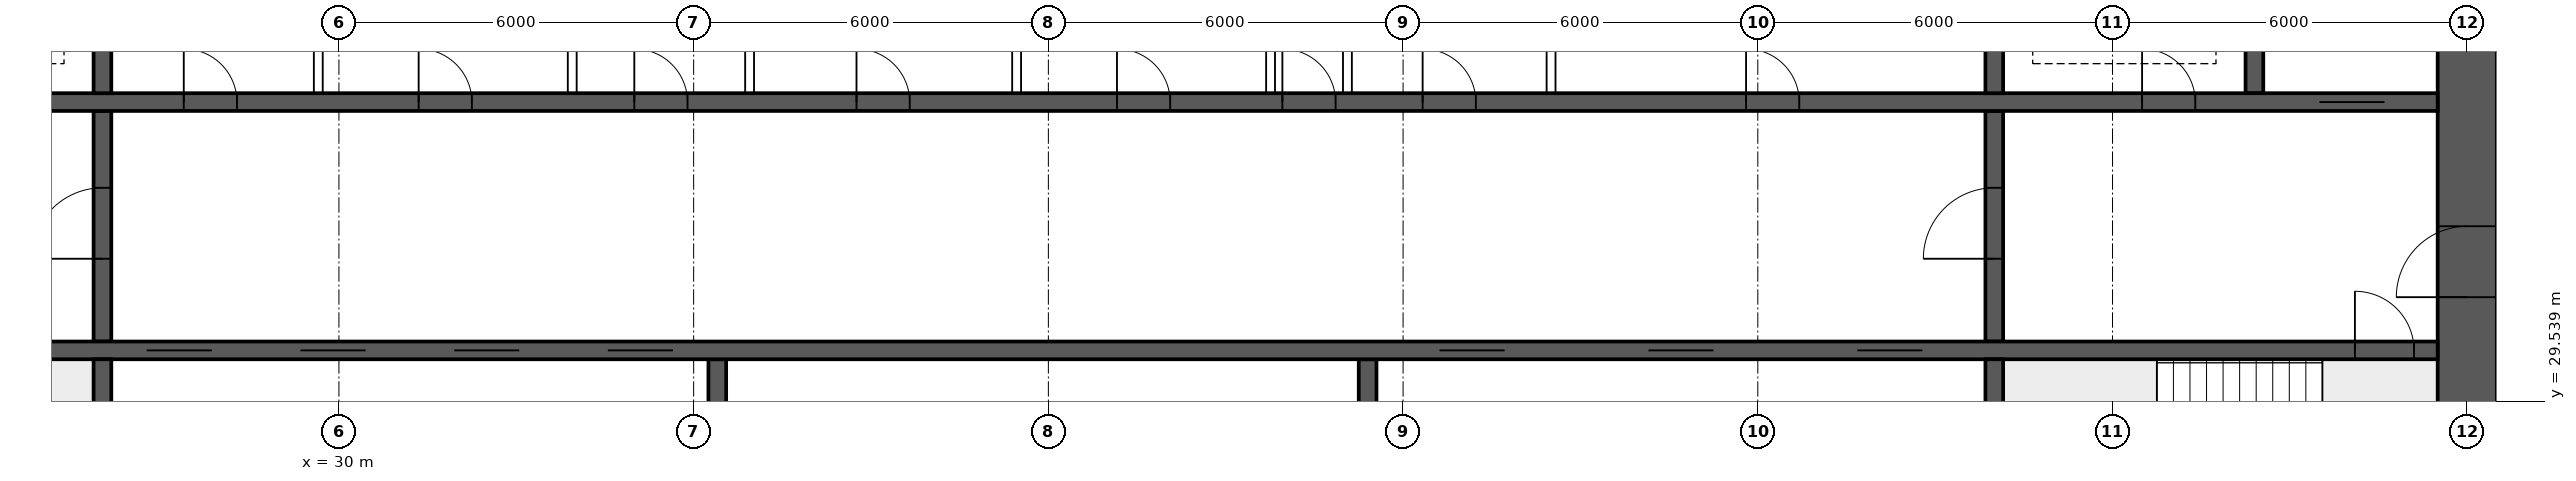
"""IFC4 building model, lengths in metres.
Left out: names, types, materials, properties, quantities, classifications, styles, units other than length and angle.
Written with IfcOpenShell. Run it as: python <this file> out.ifc"""

import sys

from ifc_helpers import new_model, si_unit, direction, frame, frame_2d, origin, place, context, subcontext, project, spatial, rectangle, extrude, element, fill, save


model = new_model("IFC4")
c1 = context("Model", 3, precision=1e-05, world=origin(), true_north=direction((0.0, 1.0)))
c2 = subcontext(c1, "Body", "Model", "MODEL_VIEW")
j1 = project(units=[si_unit("LENGTHUNIT", "METRE"), si_unit("PLANEANGLEUNIT", "RADIAN")], contexts=[c1])
p1 = place(None, origin())
s1 = spatial("IfcSite", under=j1, at=p1, CompositionType="ELEMENT")
p2 = place(p1, origin())
s2 = spatial("IfcBuilding", under=s1, at=p2, CompositionType="ELEMENT")
p3 = place(p2, frame((0.0, 0.0, 61.45)))
s3 = spatial("IfcBuildingStorey", under=s2, at=p3, CompositionType="ELEMENT", Elevation=61.45)
p4 = place(p3, frame((66.0, 26.3, 0.0), z_axis=(0.0, 0.0, 1.0), x_axis=(0.0, 1.0, 0.0)))
e1 = element("IfcWall", 1, at=p4, inside=s3, PredefinedType="SHEAR", context=c2, shape_type="SweptSolid", body=[
    extrude(rectangle(XDim=11.4, YDim=1.0, at=frame_2d((5.7, 0.0))), origin(), (0.0, 0.0, 1.0), 3.75),
])
p5 = place(p4, frame((5.0, 0.0, 0.0)))
e2 = element("IfcOpeningElement", 2, at=p5, cuts=e1, PredefinedType="OPENING", context=c2, shape_type="SweptSolid", body=[
    extrude(rectangle(XDim=1.2, YDim=2.1, at=frame_2d((0.6, 1.05))), frame((0.0, 0.51, 0.0), z_axis=(0.0, -1.0, 0.0), x_axis=(1.0, 0.0, 0.0)), (0.0, 0.0, 1.0), 1.02),
])
p6 = place(p3, frame((18.5, 30.4, 0.0), z_axis=(0.0, 0.0, 1.0), x_axis=(1.0, 0.0, 0.0)))
e3 = element("IfcWall", 3, at=p6, inside=s3, PredefinedType="SHEAR", context=c2, shape_type="SweptSolid", body=[
    extrude(rectangle(XDim=47.0, YDim=0.3, at=frame_2d((23.5, 0.0))), origin(), (0.0, 0.0, 1.0), 3.75),
])
p7 = place(p6, frame((0.4, 0.0, 0.0)))
e4 = element("IfcOpeningElement", 4, at=p7, cuts=e3, PredefinedType="OPENING", context=c2, shape_type="SweptSolid", body=[
    extrude(rectangle(XDim=1.0, YDim=2.1, at=frame_2d((0.5, 1.05))), frame((0.0, 0.16, 0.0), z_axis=(0.0, -1.0, 0.0), x_axis=(1.0, 0.0, 0.0)), (0.0, 0.0, 1.0), 0.32),
])
p8 = place(p6, frame((45.6, 0.0, 0.0)))
e5 = element("IfcOpeningElement", 5, at=p8, cuts=e3, PredefinedType="OPENING", context=c2, shape_type="SweptSolid", body=[
    extrude(rectangle(XDim=1.0, YDim=2.1, at=frame_2d((0.5, 1.05))), frame((0.0, 0.16, 0.0), z_axis=(0.0, -1.0, 0.0), x_axis=(1.0, 0.0, 0.0)), (0.0, 0.0, 1.0), 0.32),
])
p9 = place(p6, frame((8.25, 0.0, 0.0)))
e6 = element("IfcOpeningElement", 6, at=p9, cuts=e3, PredefinedType="OPENING", context=c2, shape_type="SweptSolid", body=[
    extrude(rectangle(XDim=1.1, YDim=2.1, at=frame_2d((0.55, 1.05))), frame((0.0, 0.16, 0.0), z_axis=(0.0, -1.0, 0.0), x_axis=(1.0, 0.0, 0.0)), (0.0, 0.0, 1.0), 0.32),
])
p10 = place(p6, frame((10.85, 0.0, 0.0)))
e7 = element("IfcOpeningElement", 7, at=p10, cuts=e3, PredefinedType="OPENING", context=c2, shape_type="SweptSolid", body=[
    extrude(rectangle(XDim=1.1, YDim=2.1, at=frame_2d((0.55, 1.05))), frame((0.0, 0.16, 0.0), z_axis=(0.0, -1.0, 0.0), x_axis=(1.0, 0.0, 0.0)), (0.0, 0.0, 1.0), 0.32),
])
p11 = place(p6, frame((13.45, 0.0, 0.0)))
e8 = element("IfcOpeningElement", 8, at=p11, cuts=e3, PredefinedType="OPENING", context=c2, shape_type="SweptSolid", body=[
    extrude(rectangle(XDim=1.1, YDim=2.1, at=frame_2d((0.55, 1.05))), frame((0.0, 0.16, 0.0), z_axis=(0.0, -1.0, 0.0), x_axis=(1.0, 0.0, 0.0)), (0.0, 0.0, 1.0), 0.32),
])
p12 = place(p6, frame((16.05, 0.0, 0.0)))
e9 = element("IfcOpeningElement", 9, at=p12, cuts=e3, PredefinedType="OPENING", context=c2, shape_type="SweptSolid", body=[
    extrude(rectangle(XDim=1.1, YDim=2.1, at=frame_2d((0.55, 1.05))), frame((0.0, 0.16, 0.0), z_axis=(0.0, -1.0, 0.0), x_axis=(1.0, 0.0, 0.0)), (0.0, 0.0, 1.0), 0.32),
])
p13 = place(p6, frame((30.117, 0.0, 0.0)))
e10 = element("IfcOpeningElement", 10, at=p13, cuts=e3, PredefinedType="OPENING", context=c2, shape_type="SweptSolid", body=[
    extrude(rectangle(XDim=1.1, YDim=2.1, at=frame_2d((0.55, 1.05))), frame((0.0, 0.16, 0.0), z_axis=(0.0, -1.0, 0.0), x_axis=(1.0, 0.0, 0.0)), (0.0, 0.0, 1.0), 0.32),
])
p14 = place(p6, frame((33.65, 0.0, 0.0)))
e11 = element("IfcOpeningElement", 11, at=p14, cuts=e3, PredefinedType="OPENING", context=c2, shape_type="SweptSolid", body=[
    extrude(rectangle(XDim=1.1, YDim=2.1, at=frame_2d((0.55, 1.05))), frame((0.0, 0.16, 0.0), z_axis=(0.0, -1.0, 0.0), x_axis=(1.0, 0.0, 0.0)), (0.0, 0.0, 1.0), 0.32),
])
p15 = place(p6, frame((37.183, 0.0, 0.0)))
e12 = element("IfcOpeningElement", 12, at=p15, cuts=e3, PredefinedType="OPENING", context=c2, shape_type="SweptSolid", body=[
    extrude(rectangle(XDim=1.1, YDim=2.1, at=frame_2d((0.55, 1.05))), frame((0.0, 0.16, 0.0), z_axis=(0.0, -1.0, 0.0), x_axis=(1.0, 0.0, 0.0)), (0.0, 0.0, 1.0), 0.32),
])
p16 = place(p3, frame((18.5, 34.6, 0.0), z_axis=(0.0, 0.0, 1.0), x_axis=(1.0, 0.0, 0.0)))
e13 = element("IfcWall", 13, at=p16, inside=s3, PredefinedType="SHEAR", context=c2, shape_type="SweptSolid", body=[
    extrude(rectangle(XDim=47.0, YDim=0.3, at=frame_2d((23.5, 0.0))), origin(), (0.0, 0.0, 1.0), 3.75),
])
p17 = place(p16, frame((0.9, 0.0, 0.0)))
e14 = element("IfcOpeningElement", 14, at=p17, cuts=e13, PredefinedType="OPENING", context=c2, shape_type="SweptSolid", body=[
    extrude(rectangle(XDim=1.1, YDim=2.1, at=frame_2d((0.55, 1.05))), frame((0.0, 0.16, 0.0), z_axis=(0.0, -1.0, 0.0), x_axis=(1.0, 0.0, 0.0)), (0.0, 0.0, 1.0), 0.32),
])
p18 = place(p16, frame((45.0, 0.0, 0.0)))
e15 = element("IfcOpeningElement", 15, at=p18, cuts=e13, PredefinedType="OPENING", context=c2, shape_type="SweptSolid", body=[
    extrude(rectangle(XDim=1.1, YDim=2.1, at=frame_2d((0.55, 1.05))), frame((0.0, 0.16, 0.0), z_axis=(0.0, -1.0, 0.0), x_axis=(1.0, 0.0, 0.0)), (0.0, 0.0, 1.0), 0.32),
])
p19 = place(p16, frame((4.1, 0.0, 0.0)))
e16 = element("IfcOpeningElement", 16, at=p19, cuts=e13, PredefinedType="OPENING", context=c2, shape_type="SweptSolid", body=[
    extrude(rectangle(XDim=0.9, YDim=2.1, at=frame_2d((0.45, 1.05))), frame((0.0, 0.16, 0.0), z_axis=(0.0, -1.0, 0.0), x_axis=(1.0, 0.0, 0.0)), (0.0, 0.0, 1.0), 0.32),
])
p20 = place(p16, frame((42.0, 0.0, 0.0)))
e17 = element("IfcOpeningElement", 17, at=p20, cuts=e13, PredefinedType="OPENING", context=c2, shape_type="SweptSolid", body=[
    extrude(rectangle(XDim=0.9, YDim=2.1, at=frame_2d((0.45, 1.05))), frame((0.0, 0.16, 0.0), z_axis=(0.0, -1.0, 0.0), x_axis=(1.0, 0.0, 0.0)), (0.0, 0.0, 1.0), 0.32),
])
p21 = place(p16, frame((8.875, 0.0, 0.0)))
e18 = element("IfcOpeningElement", 18, at=p21, cuts=e13, PredefinedType="OPENING", context=c2, shape_type="SweptSolid", body=[
    extrude(rectangle(XDim=0.9, YDim=2.1, at=frame_2d((0.45, 1.05))), frame((0.0, 0.16, 0.0), z_axis=(0.0, -1.0, 0.0), x_axis=(1.0, 0.0, 0.0)), (0.0, 0.0, 1.0), 0.32),
])
p22 = place(p16, frame((12.849, 0.0, 0.0)))
e19 = element("IfcOpeningElement", 19, at=p22, cuts=e13, PredefinedType="OPENING", context=c2, shape_type="SweptSolid", body=[
    extrude(rectangle(XDim=0.9, YDim=2.1, at=frame_2d((0.45, 1.05))), frame((0.0, 0.16, 0.0), z_axis=(0.0, -1.0, 0.0), x_axis=(1.0, 0.0, 0.0)), (0.0, 0.0, 1.0), 0.32),
])
p23 = place(p16, frame((16.496, 0.0, 0.0)))
e20 = element("IfcOpeningElement", 20, at=p23, cuts=e13, PredefinedType="OPENING", context=c2, shape_type="SweptSolid", body=[
    extrude(rectangle(XDim=0.9, YDim=2.1, at=frame_2d((0.45, 1.05))), frame((0.0, 0.16, 0.0), z_axis=(0.0, -1.0, 0.0), x_axis=(1.0, 0.0, 0.0)), (0.0, 0.0, 1.0), 0.32),
])
p24 = place(p16, frame((20.255, 0.0, 0.0)))
e21 = element("IfcOpeningElement", 21, at=p24, cuts=e13, PredefinedType="OPENING", context=c2, shape_type="SweptSolid", body=[
    extrude(rectangle(XDim=0.9, YDim=2.1, at=frame_2d((0.45, 1.05))), frame((0.0, 0.16, 0.0), z_axis=(0.0, -1.0, 0.0), x_axis=(1.0, 0.0, 0.0)), (0.0, 0.0, 1.0), 0.32),
])
p25 = place(p16, frame((24.661, 0.0, 0.0)))
e22 = element("IfcOpeningElement", 22, at=p25, cuts=e13, PredefinedType="OPENING", context=c2, shape_type="SweptSolid", body=[
    extrude(rectangle(XDim=0.9, YDim=2.1, at=frame_2d((0.45, 1.05))), frame((0.0, 0.16, 0.0), z_axis=(0.0, -1.0, 0.0), x_axis=(1.0, 0.0, 0.0)), (0.0, 0.0, 1.0), 0.32),
])
p26 = place(p16, frame((27.458, 0.0, 0.0)))
e23 = element("IfcOpeningElement", 23, at=p26, cuts=e13, PredefinedType="OPENING", context=c2, shape_type="SweptSolid", body=[
    extrude(rectangle(XDim=0.9, YDim=2.1, at=frame_2d((0.45, 1.05))), frame((0.0, 0.16, 0.0), z_axis=(0.0, -1.0, 0.0), x_axis=(1.0, 0.0, 0.0)), (0.0, 0.0, 1.0), 0.32),
])
p27 = place(p16, frame((29.831, 0.0, 0.0)))
e24 = element("IfcOpeningElement", 24, at=p27, cuts=e13, PredefinedType="OPENING", context=c2, shape_type="SweptSolid", body=[
    extrude(rectangle(XDim=0.9, YDim=2.1, at=frame_2d((0.45, 1.05))), frame((0.0, 0.16, 0.0), z_axis=(0.0, -1.0, 0.0), x_axis=(1.0, 0.0, 0.0)), (0.0, 0.0, 1.0), 0.32),
])
p28 = place(p16, frame((35.302, 0.0, 0.0)))
e25 = element("IfcOpeningElement", 25, at=p28, cuts=e13, PredefinedType="OPENING", context=c2, shape_type="SweptSolid", body=[
    extrude(rectangle(XDim=0.9, YDim=2.1, at=frame_2d((0.45, 1.05))), frame((0.0, 0.16, 0.0), z_axis=(0.0, -1.0, 0.0), x_axis=(1.0, 0.0, 0.0)), (0.0, 0.0, 1.0), 0.32),
])
for number, where, z_axis, x_axis in (
    (26, (26.0, 26.3, 0.0), (0.0, 0.0, 1.0), (0.0, 1.0, 0.0)),
    (27, (58.0, 26.3, 0.0), (0.0, 0.0, 1.0), (0.0, 1.0, 0.0)),
):
    element("IfcWall", number, at=place(p3, frame(where, z_axis=z_axis, x_axis=x_axis)), inside=s3, PredefinedType="SHEAR", context=c2, shape_type="SweptSolid", body=[
        extrude(rectangle(XDim=3.95, YDim=0.3, at=frame_2d((1.975, 0.0))), origin(), (0.0, 0.0, 1.0), 3.75),
    ])
p29 = place(p3, frame((26.0, 30.55, 0.0), z_axis=(0.0, 0.0, 1.0), x_axis=(0.0, 1.0, 0.0)))
e28 = element("IfcWall", 28, at=p29, inside=s3, PredefinedType="SHEAR", context=c2, shape_type="SweptSolid", body=[
    extrude(rectangle(XDim=3.9, YDim=0.3, at=frame_2d((1.95, 0.0))), origin(), (0.0, 0.0, 1.0), 3.75),
])
p30 = place(p29, frame((1.4, 0.0, 0.0)))
e29 = element("IfcOpeningElement", 29, at=p30, cuts=e28, PredefinedType="OPENING", context=c2, shape_type="SweptSolid", body=[
    extrude(rectangle(XDim=1.2, YDim=2.1, at=frame_2d((0.6, 1.05))), frame((0.0, 0.16, 0.0), z_axis=(0.0, -1.0, 0.0), x_axis=(1.0, 0.0, 0.0)), (0.0, 0.0, 1.0), 0.32),
])
p31 = place(p3, frame((58.0, 30.55, 0.0), z_axis=(0.0, 0.0, 1.0), x_axis=(0.0, 1.0, 0.0)))
e30 = element("IfcWall", 30, at=p31, inside=s3, PredefinedType="SHEAR", context=c2, shape_type="SweptSolid", body=[
    extrude(rectangle(XDim=3.9, YDim=0.3, at=frame_2d((1.95, 0.0))), origin(), (0.0, 0.0, 1.0), 3.75),
])
p32 = place(p31, frame((1.4, 0.0, 0.0)))
e31 = element("IfcOpeningElement", 31, at=p32, cuts=e30, PredefinedType="OPENING", context=c2, shape_type="SweptSolid", body=[
    extrude(rectangle(XDim=1.2, YDim=2.1, at=frame_2d((0.6, 1.05))), frame((0.0, 0.16, 0.0), z_axis=(0.0, -1.0, 0.0), x_axis=(1.0, 0.0, 0.0)), (0.0, 0.0, 1.0), 0.32),
])
for number, where, z_axis, x_axis in (
    (32, (62.4, 34.75, 0.0), (0.0, 0.0, 1.0), (0.0, 1.0, 0.0)),
    (33, (26.0, 34.75, 0.0), (0.0, 0.0, 1.0), (0.0, 1.0, 0.0)),
    (34, (58.0, 34.75, 0.0), (0.0, 0.0, 1.0), (0.0, 1.0, 0.0)),
):
    element("IfcWall", number, at=place(p3, frame(where, z_axis=z_axis, x_axis=x_axis)), inside=s3, PredefinedType="SHEAR", context=c2, shape_type="SweptSolid", body=[
        extrude(rectangle(XDim=2.95, YDim=0.3, at=frame_2d((1.475, 0.0))), origin(), (0.0, 0.0, 1.0), 3.75),
    ])
for number, where, z_axis, x_axis in (
    (35, (36.4, 26.3, 0.0), (0.0, 0.0, 1.0), (0.0, 1.0, 0.0)),
    (36, (47.4, 26.3, 0.0), (0.0, 0.0, 1.0), (0.0, 1.0, 0.0)),
):
    element("IfcWall", number, at=place(p3, frame(where, z_axis=z_axis, x_axis=x_axis)), inside=s3, PredefinedType="SHEAR", context=c2, shape_type="SweptSolid", body=[
        extrude(rectangle(XDim=3.95, YDim=0.3, at=frame_2d((1.975, 0.0))), origin(), (0.0, 0.0, 1.0), 3.75),
    ])
for number, where, z_axis, x_axis in (
    (37, (29.651, 34.75, 0.0), (0.0, 0.0, 1.0), (0.0, 1.0, 0.0)),
    (38, (33.946, 34.75, 0.0), (0.0, 0.0, 1.0), (0.0, 1.0, 0.0)),
    (39, (36.946, 34.75, 0.0), (0.0, 0.0, 1.0), (0.0, 1.0, 0.0)),
    (40, (41.463, 34.75, 0.0), (0.0, 0.0, 1.0), (0.0, 1.0, 0.0)),
    (41, (45.758, 34.75, 0.0), (0.0, 0.0, 1.0), (0.0, 1.0, 0.0)),
    (42, (47.058, 34.75, 0.0), (0.0, 0.0, 1.0), (0.0, 1.0, 0.0)),
    (43, (50.503, 34.75, 0.0), (0.0, 0.0, 1.0), (0.0, 1.0, 0.0)),
):
    element("IfcWall", number, at=place(p3, frame(where, z_axis=z_axis, x_axis=x_axis)), inside=s3, PredefinedType="SOLIDWALL", context=c2, shape_type="SweptSolid", body=[
        extrude(rectangle(XDim=2.95, YDim=0.15, at=frame_2d((1.475, 0.0))), origin(), (0.0, 0.0, 1.0), 3.5),
    ])
p33 = place(p5, origin())
e44 = element("IfcDoor", 44, at=p33, inside=s3, OperationType="SINGLE_SWING_LEFT", PredefinedType="DOOR", context=c2, shape_type="SweptSolid", body=[
    extrude(rectangle(XDim=1.2, YDim=2.1, at=frame_2d((0.6, 1.05))), frame((0.0, 0.025, 0.0), z_axis=(0.0, -1.0, 0.0), x_axis=(1.0, 0.0, 0.0)), (0.0, 0.0, 1.0), 0.05),
])
fill(e2, e44)
p34 = place(p8, origin())
e45 = element("IfcDoor", 45, at=p34, inside=s3, OperationType="SINGLE_SWING_LEFT", PredefinedType="DOOR", context=c2, shape_type="SweptSolid", body=[
    extrude(rectangle(XDim=1.0, YDim=2.1, at=frame_2d((0.5, 1.05))), frame((0.0, 0.025, 0.0), z_axis=(0.0, -1.0, 0.0), x_axis=(1.0, 0.0, 0.0)), (0.0, 0.0, 1.0), 0.05),
])
fill(e5, e45)
p35 = place(p18, origin())
e46 = element("IfcDoor", 46, at=p35, inside=s3, OperationType="DOUBLE_DOOR_SLIDING", PredefinedType="DOOR", context=c2, shape_type="SweptSolid", body=[
    extrude(rectangle(XDim=1.1, YDim=2.1, at=frame_2d((0.55, 1.05))), frame((0.0, 0.025, 0.0), z_axis=(0.0, -1.0, 0.0), x_axis=(1.0, 0.0, 0.0)), (0.0, 0.0, 1.0), 0.05),
])
fill(e15, e46)
p36 = place(p20, origin())
e47 = element("IfcDoor", 47, at=p36, inside=s3, OperationType="SINGLE_SWING_LEFT", PredefinedType="DOOR", context=c2, shape_type="SweptSolid", body=[
    extrude(rectangle(XDim=0.9, YDim=2.1, at=frame_2d((0.45, 1.05))), frame((0.0, 0.025, 0.0), z_axis=(0.0, -1.0, 0.0), x_axis=(1.0, 0.0, 0.0)), (0.0, 0.0, 1.0), 0.05),
])
fill(e17, e47)
p37 = place(p30, origin())
e48 = element("IfcDoor", 48, at=p37, inside=s3, OperationType="SINGLE_SWING_LEFT", PredefinedType="DOOR", context=c2, shape_type="SweptSolid", body=[
    extrude(rectangle(XDim=1.2, YDim=2.1, at=frame_2d((0.6, 1.05))), frame((0.0, 0.025, 0.0), z_axis=(0.0, -1.0, 0.0), x_axis=(1.0, 0.0, 0.0)), (0.0, 0.0, 1.0), 0.05),
])
fill(e29, e48)
p38 = place(p32, origin())
e49 = element("IfcDoor", 49, at=p38, inside=s3, OperationType="SINGLE_SWING_LEFT", PredefinedType="DOOR", context=c2, shape_type="SweptSolid", body=[
    extrude(rectangle(XDim=1.2, YDim=2.1, at=frame_2d((0.6, 1.05))), frame((0.0, 0.025, 0.0), z_axis=(0.0, -1.0, 0.0), x_axis=(1.0, 0.0, 0.0)), (0.0, 0.0, 1.0), 0.05),
])
fill(e31, e49)
p39 = place(p21, origin())
e50 = element("IfcDoor", 50, at=p39, inside=s3, OperationType="SINGLE_SWING_LEFT", PredefinedType="DOOR", context=c2, shape_type="SweptSolid", body=[
    extrude(rectangle(XDim=0.9, YDim=2.1, at=frame_2d((0.45, 1.05))), frame((0.0, 0.025, 0.0), z_axis=(0.0, -1.0, 0.0), x_axis=(1.0, 0.0, 0.0)), (0.0, 0.0, 1.0), 0.05),
])
fill(e18, e50)
p40 = place(p22, origin())
e51 = element("IfcDoor", 51, at=p40, inside=s3, OperationType="SINGLE_SWING_LEFT", PredefinedType="DOOR", context=c2, shape_type="SweptSolid", body=[
    extrude(rectangle(XDim=0.9, YDim=2.1, at=frame_2d((0.45, 1.05))), frame((0.0, 0.025, 0.0), z_axis=(0.0, -1.0, 0.0), x_axis=(1.0, 0.0, 0.0)), (0.0, 0.0, 1.0), 0.05),
])
fill(e19, e51)
p41 = place(p23, origin())
e52 = element("IfcDoor", 52, at=p41, inside=s3, OperationType="SINGLE_SWING_LEFT", PredefinedType="DOOR", context=c2, shape_type="SweptSolid", body=[
    extrude(rectangle(XDim=0.9, YDim=2.1, at=frame_2d((0.45, 1.05))), frame((0.0, 0.025, 0.0), z_axis=(0.0, -1.0, 0.0), x_axis=(1.0, 0.0, 0.0)), (0.0, 0.0, 1.0), 0.05),
])
fill(e20, e52)
p42 = place(p24, origin())
e53 = element("IfcDoor", 53, at=p42, inside=s3, OperationType="SINGLE_SWING_LEFT", PredefinedType="DOOR", context=c2, shape_type="SweptSolid", body=[
    extrude(rectangle(XDim=0.9, YDim=2.1, at=frame_2d((0.45, 1.05))), frame((0.0, 0.025, 0.0), z_axis=(0.0, -1.0, 0.0), x_axis=(1.0, 0.0, 0.0)), (0.0, 0.0, 1.0), 0.05),
])
fill(e21, e53)
p43 = place(p25, origin())
e54 = element("IfcDoor", 54, at=p43, inside=s3, OperationType="SINGLE_SWING_LEFT", PredefinedType="DOOR", context=c2, shape_type="SweptSolid", body=[
    extrude(rectangle(XDim=0.9, YDim=2.1, at=frame_2d((0.45, 1.05))), frame((0.0, 0.025, 0.0), z_axis=(0.0, -1.0, 0.0), x_axis=(1.0, 0.0, 0.0)), (0.0, 0.0, 1.0), 0.05),
])
fill(e22, e54)
p44 = place(p26, origin())
e55 = element("IfcDoor", 55, at=p44, inside=s3, OperationType="SINGLE_SWING_LEFT", PredefinedType="DOOR", context=c2, shape_type="SweptSolid", body=[
    extrude(rectangle(XDim=0.9, YDim=2.1, at=frame_2d((0.45, 1.05))), frame((0.0, 0.025, 0.0), z_axis=(0.0, -1.0, 0.0), x_axis=(1.0, 0.0, 0.0)), (0.0, 0.0, 1.0), 0.05),
])
fill(e23, e55)
p45 = place(p27, origin())
e56 = element("IfcDoor", 56, at=p45, inside=s3, OperationType="SINGLE_SWING_LEFT", PredefinedType="DOOR", context=c2, shape_type="SweptSolid", body=[
    extrude(rectangle(XDim=0.9, YDim=2.1, at=frame_2d((0.45, 1.05))), frame((0.0, 0.025, 0.0), z_axis=(0.0, -1.0, 0.0), x_axis=(1.0, 0.0, 0.0)), (0.0, 0.0, 1.0), 0.05),
])
fill(e24, e56)
p46 = place(p28, origin())
e57 = element("IfcDoor", 57, at=p46, inside=s3, OperationType="SINGLE_SWING_LEFT", PredefinedType="DOOR", context=c2, shape_type="SweptSolid", body=[
    extrude(rectangle(XDim=0.9, YDim=2.1, at=frame_2d((0.45, 1.05))), frame((0.0, 0.025, 0.0), z_axis=(0.0, -1.0, 0.0), x_axis=(1.0, 0.0, 0.0)), (0.0, 0.0, 1.0), 0.05),
])
fill(e25, e57)
p47 = place(p9, origin())
e58 = element("IfcDoor", 58, at=p47, inside=s3, OperationType="DOUBLE_DOOR_SLIDING", PredefinedType="DOOR", context=c2, shape_type="SweptSolid", body=[
    extrude(rectangle(XDim=1.1, YDim=2.1, at=frame_2d((0.55, 1.05))), frame((0.0, 0.025, 0.0), z_axis=(0.0, -1.0, 0.0), x_axis=(1.0, 0.0, 0.0)), (0.0, 0.0, 1.0), 0.05),
])
fill(e6, e58)
p48 = place(p10, origin())
e59 = element("IfcDoor", 59, at=p48, inside=s3, OperationType="DOUBLE_DOOR_SLIDING", PredefinedType="DOOR", context=c2, shape_type="SweptSolid", body=[
    extrude(rectangle(XDim=1.1, YDim=2.1, at=frame_2d((0.55, 1.05))), frame((0.0, 0.025, 0.0), z_axis=(0.0, -1.0, 0.0), x_axis=(1.0, 0.0, 0.0)), (0.0, 0.0, 1.0), 0.05),
])
fill(e7, e59)
p49 = place(p11, origin())
e60 = element("IfcDoor", 60, at=p49, inside=s3, OperationType="DOUBLE_DOOR_SLIDING", PredefinedType="DOOR", context=c2, shape_type="SweptSolid", body=[
    extrude(rectangle(XDim=1.1, YDim=2.1, at=frame_2d((0.55, 1.05))), frame((0.0, 0.025, 0.0), z_axis=(0.0, -1.0, 0.0), x_axis=(1.0, 0.0, 0.0)), (0.0, 0.0, 1.0), 0.05),
])
fill(e8, e60)
p50 = place(p12, origin())
e61 = element("IfcDoor", 61, at=p50, inside=s3, OperationType="DOUBLE_DOOR_SLIDING", PredefinedType="DOOR", context=c2, shape_type="SweptSolid", body=[
    extrude(rectangle(XDim=1.1, YDim=2.1, at=frame_2d((0.55, 1.05))), frame((0.0, 0.025, 0.0), z_axis=(0.0, -1.0, 0.0), x_axis=(1.0, 0.0, 0.0)), (0.0, 0.0, 1.0), 0.05),
])
fill(e9, e61)
p51 = place(p13, origin())
e62 = element("IfcDoor", 62, at=p51, inside=s3, OperationType="DOUBLE_DOOR_SLIDING", PredefinedType="DOOR", context=c2, shape_type="SweptSolid", body=[
    extrude(rectangle(XDim=1.1, YDim=2.1, at=frame_2d((0.55, 1.05))), frame((0.0, 0.025, 0.0), z_axis=(0.0, -1.0, 0.0), x_axis=(1.0, 0.0, 0.0)), (0.0, 0.0, 1.0), 0.05),
])
fill(e10, e62)
p52 = place(p14, origin())
e63 = element("IfcDoor", 63, at=p52, inside=s3, OperationType="DOUBLE_DOOR_SLIDING", PredefinedType="DOOR", context=c2, shape_type="SweptSolid", body=[
    extrude(rectangle(XDim=1.1, YDim=2.1, at=frame_2d((0.55, 1.05))), frame((0.0, 0.025, 0.0), z_axis=(0.0, -1.0, 0.0), x_axis=(1.0, 0.0, 0.0)), (0.0, 0.0, 1.0), 0.05),
])
fill(e11, e63)
p53 = place(p15, origin())
e64 = element("IfcDoor", 64, at=p53, inside=s3, OperationType="DOUBLE_DOOR_SLIDING", PredefinedType="DOOR", context=c2, shape_type="SweptSolid", body=[
    extrude(rectangle(XDim=1.1, YDim=2.1, at=frame_2d((0.55, 1.05))), frame((0.0, 0.025, 0.0), z_axis=(0.0, -1.0, 0.0), x_axis=(1.0, 0.0, 0.0)), (0.0, 0.0, 1.0), 0.05),
])
fill(e12, e64)
save(model, sys.argv[1])
